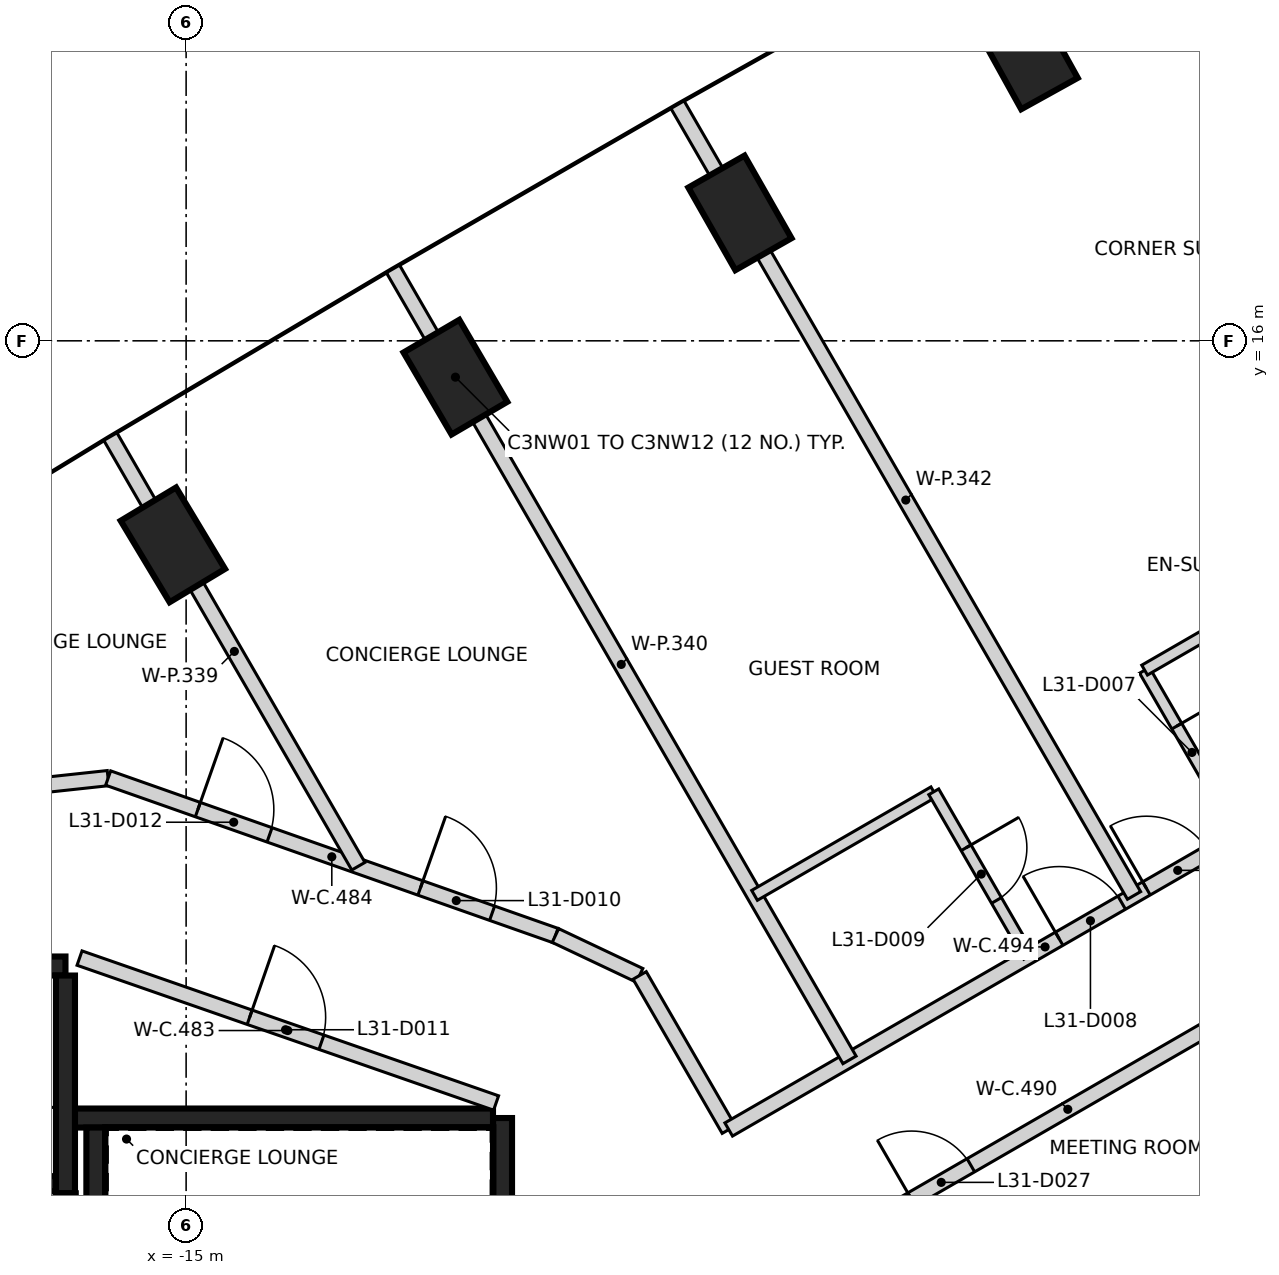
"""IFC4 building model, lengths in metres.
Left out: names, types, materials, properties, quantities, classifications, styles, units other than length and angle.
Written with IfcOpenShell. Run it as: python <this file> out.ifc"""

import sys

from ifc_helpers import new_model, si_unit, direction, frame, frame_2d, origin, origin_2d, place, context, subcontext, project, spatial, rectangle, extrude, element, fill, save


model = new_model("IFC4")
c1 = context("Model", 3, precision=1e-05, world=origin(), true_north=direction((0.0, 1.0)))
c2 = subcontext(c1, "Body", "Model", "MODEL_VIEW")
j1 = project(units=[si_unit("LENGTHUNIT", "METRE"), si_unit("PLANEANGLEUNIT", "RADIAN")], contexts=[c1])
p1 = place(None, origin())
s1 = spatial("IfcSite", under=j1, at=p1, CompositionType="ELEMENT")
p2 = place(p1, origin())
s2 = spatial("IfcBuilding", under=s1, at=p2, CompositionType="ELEMENT")
p3 = place(p2, frame((0.0, 0.0, 128.8)))
s3 = spatial("IfcBuildingStorey", under=s2, at=p3, CompositionType="ELEMENT", Elevation=128.8)
for number, where, z_axis, x_axis in (
    (1, (-3.945, 19.8, -0.4), (0.0, 0.0, 1.0), (-0.485, 0.875, 0.0)),
    (2, (-7.714, 17.683, -0.4), (0.0, 0.0, 1.0), (-0.495, 0.869, 0.0)),
    (3, (-11.457, 15.522, -0.4), (0.0, 0.0, 1.0), (-0.505, 0.863, 0.0)),
    (4, (-15.175, 13.316, -0.4), (0.0, 0.0, 1.0), (-0.515, 0.857, 0.0)),
):
    element("IfcColumn", number, at=place(p3, frame(where, z_axis=z_axis, x_axis=x_axis)), inside=s3, PredefinedType="COLUMN", context=c2, shape_type="SweptSolid", body=[
        extrude(rectangle(XDim=1.25, YDim=0.85, at=origin_2d()), origin(), (0.0, 0.0, 1.0), 3.6),
    ])
p4 = place(p3, frame((-10.837, 5.775, 0.0), z_axis=(0.0, 0.0, 1.0), x_axis=(0.0, -1.0, 0.0)))
e5 = element("IfcWall", 5, at=p4, inside=s3, PredefinedType="SHEAR", context=c2, shape_type="SweptSolid", body=[
    extrude(rectangle(XDim=11.55, YDim=0.25, at=frame_2d((5.775, 0.0))), origin(), (0.0, 0.0, 1.0), 3.2),
])
p5 = place(p4, frame((10.025, 0.0, 0.0)))
e6 = element("IfcOpeningElement", 6, at=p5, cuts=e5, PredefinedType="OPENING", context=c2, shape_type="SweptSolid", body=[
    extrude(rectangle(XDim=1.2, YDim=2.1, at=frame_2d((0.6, 1.05))), frame((0.0, 0.135, 0.0), z_axis=(0.0, -1.0, 0.0), x_axis=(1.0, 0.0, 0.0)), (0.0, 0.0, 1.0), 0.27),
])
p6 = place(p4, frame((8.725, 0.0, 0.0)))
e7 = element("IfcOpeningElement", 7, at=p6, cuts=e5, PredefinedType="OPENING", context=c2, shape_type="SweptSolid", body=[
    extrude(rectangle(XDim=1.2, YDim=2.1, at=frame_2d((0.6, 1.05))), frame((0.0, 0.135, 0.0), z_axis=(0.0, -1.0, 0.0), x_axis=(1.0, 0.0, 0.0)), (0.0, 0.0, 1.0), 0.27),
])
p7 = place(p3, frame((-16.472, 5.775, 0.0), z_axis=(0.0, 0.0, 1.0), x_axis=(1.0, 0.0, 0.0)))
e8 = element("IfcWall", 8, at=p7, inside=s3, PredefinedType="SHEAR", context=c2, shape_type="SweptSolid", body=[
    extrude(rectangle(XDim=5.51, YDim=0.25, at=frame_2d((2.755, 0.0))), origin(), (0.0, 0.0, 1.0), 3.2),
])
p8 = place(p3, frame((-19.637, 7.775, 0.0), z_axis=(0.0, 0.0, 1.0), x_axis=(1.0, 0.0, 0.0)))
e9 = element("IfcWall", 9, at=p8, inside=s3, PredefinedType="SHEAR", context=c2, shape_type="SweptSolid", body=[
    extrude(rectangle(XDim=3.05, YDim=0.25, at=frame_2d((1.525, 0.0))), origin(), (0.0, 0.0, 1.0), 3.2),
])
p9 = place(p3, frame((-16.587, 7.65, 0.0), z_axis=(0.0, 0.0, 1.0), x_axis=(0.0, -1.0, 0.0)))
e10 = element("IfcWall", 10, at=p9, inside=s3, PredefinedType="SHEAR", context=c2, shape_type="SweptSolid", body=[
    extrude(rectangle(XDim=2.865, YDim=0.25, at=frame_2d((1.432, 0.0))), origin(), (0.0, 0.0, 1.0), 3.2),
])
p10 = place(p3, frame((-16.187, 3.2, 0.0), z_axis=(0.0, 0.0, 1.0), x_axis=(0.0, 1.0, 0.0)))
e11 = element("IfcWall", 11, at=p10, inside=s3, PredefinedType="SHEAR", context=c2, shape_type="SweptSolid", body=[
    extrude(rectangle(XDim=2.449, YDim=0.25, at=frame_2d((1.225, 0.0))), origin(), (0.0, 0.0, 1.0), 3.2),
])
p11 = place(p3, frame((-16.577, 4.785, 0.0), z_axis=(0.0, 0.0, 1.0), x_axis=(0.0, -1.0, 0.0)))
e12 = element("IfcWall", 12, at=p11, inside=s3, PredefinedType="SHEAR", context=c2, shape_type="SweptSolid", body=[
    extrude(rectangle(XDim=0.344, YDim=0.25, at=frame_2d((0.172, 0.0))), origin(), (0.0, 0.0, 1.0), 3.2),
])
p12 = place(p3, frame((-19.511, 4.91, 0.0), z_axis=(0.0, 0.0, 1.0), x_axis=(1.0, 0.0, 0.0)))
e13 = element("IfcWall", 13, at=p12, inside=s3, PredefinedType="SHEAR", context=c2, shape_type="SweptSolid", body=[
    extrude(rectangle(XDim=2.798, YDim=0.2, at=frame_2d((1.399, 0.0))), origin(), (0.0, 0.0, 1.0), 3.2),
])
p13 = place(p12, frame((0.949, 0.0, 0.0)))
e14 = element("IfcOpeningElement", 14, at=p13, cuts=e13, PredefinedType="OPENING", context=c2, shape_type="SweptSolid", body=[
    extrude(rectangle(XDim=0.9, YDim=2.1, at=frame_2d((0.45, 1.05))), frame((0.0, 0.11, 0.0), z_axis=(0.0, -1.0, 0.0), x_axis=(1.0, 0.0, 0.0)), (0.0, 0.0, 1.0), 0.22),
])
p14 = place(p3, frame((-18.865, 9.941, 0.0), z_axis=(0.0, 0.0, 1.0), x_axis=(0.99423123086, 0.107257911519, 0.0)))
e15 = element("IfcWall", 15, at=p14, inside=s3, PredefinedType="PARTITIONING", context=c2, shape_type="SweptSolid", body=[
    extrude(rectangle(XDim=2.854, YDim=0.2, at=frame_2d((1.427, 0.0))), origin(), (0.0, 0.0, 1.0), 3.2),
])
p15 = place(p3, frame((-16.402, 7.879, 0.0), z_axis=(0.0, 0.0, 1.0), x_axis=(0.944492255471, -0.328533680702, 0.0)))
e16 = element("IfcWall", 16, at=p15, inside=s3, PredefinedType="PARTITIONING", context=c2, shape_type="SweptSolid", body=[
    extrude(rectangle(XDim=5.802, YDim=0.2, at=frame_2d((2.901, 0.0))), origin(), (0.0, 0.0, 1.0), 3.2),
])
p16 = place(p15, frame((2.37, 0.0, 0.0)))
e17 = element("IfcOpeningElement", 17, at=p16, cuts=e16, PredefinedType="OPENING", context=c2, shape_type="SweptSolid", body=[
    extrude(rectangle(XDim=1.0, YDim=2.1, at=frame_2d((0.5, 1.05))), frame((0.0, 0.11, 0.0), z_axis=(0.0, -1.0, 0.0), x_axis=(1.0, 0.0, 0.0)), (0.0, 0.0, 1.0), 0.22),
])
p17 = place(p3, frame((-16.026, 10.248, 0.0), z_axis=(0.0, 0.0, 1.0), x_axis=(0.943234993827, -0.332126100179, 0.0)))
e18 = element("IfcWall", 18, at=p17, inside=s3, PredefinedType="PARTITIONING", context=c2, shape_type="SweptSolid", body=[
    extrude(rectangle(XDim=6.239, YDim=0.2, at=frame_2d((3.119, 0.0))), origin(), (0.0, 0.0, 1.0), 3.2),
])
p18 = place(p17, frame((4.355, 0.0, 0.0)))
e19 = element("IfcOpeningElement", 19, at=p18, cuts=e18, PredefinedType="OPENING", context=c2, shape_type="SweptSolid", body=[
    extrude(rectangle(XDim=1.0, YDim=2.1, at=frame_2d((0.5, 1.05))), frame((0.0, 0.11, 0.0), z_axis=(0.0, -1.0, 0.0), x_axis=(1.0, 0.0, 0.0)), (0.0, 0.0, 1.0), 0.22),
])
p19 = place(p17, frame((1.251, 0.0, 0.0)))
e20 = element("IfcOpeningElement", 20, at=p19, cuts=e18, PredefinedType="OPENING", context=c2, shape_type="SweptSolid", body=[
    extrude(rectangle(XDim=1.0, YDim=2.1, at=frame_2d((0.5, 1.05))), frame((0.0, 0.11, 0.0), z_axis=(0.0, -1.0, 0.0), x_axis=(1.0, 0.0, 0.0)), (0.0, 0.0, 1.0), 0.22),
])
p20 = place(p3, frame((-10.141, 8.176, 0.0), z_axis=(0.0, 0.0, 1.0), x_axis=(0.903904169039, -0.427735026849, 0.0)))
e21 = element("IfcWall", 21, at=p20, inside=s3, PredefinedType="PARTITIONING", context=c2, shape_type="SweptSolid", body=[
    extrude(rectangle(XDim=1.225, YDim=0.2, at=frame_2d((0.612, 0.0))), origin(), (0.0, 0.0, 1.0), 3.2),
])
p21 = place(p3, frame((-9.033, 7.651, 0.0), z_axis=(0.0, 0.0, 1.0), x_axis=(0.500354010599, -0.865820919173, 0.0)))
e22 = element("IfcWall", 22, at=p21, inside=s3, PredefinedType="PARTITIONING", context=c2, shape_type="SweptSolid", body=[
    extrude(rectangle(XDim=2.342, YDim=0.2, at=frame_2d((1.171, 0.0))), origin(), (0.0, 0.0, 1.0), 3.2),
])
p22 = place(p3, frame((-8.613, 2.881, 0.0), z_axis=(0.0, 0.0, 1.0), x_axis=(0.866103179807, 0.499865263774, 0.0)))
e23 = element("IfcWall", 23, at=p22, inside=s3, PredefinedType="PARTITIONING", context=c2, shape_type="SweptSolid", body=[
    extrude(rectangle(XDim=12.036, YDim=0.2, at=frame_2d((6.018, 0.0))), origin(), (0.0, 0.0, 1.0), 3.2),
])
p23 = place(p22, frame((9.652, 0.0, 0.0)))
e24 = element("IfcOpeningElement", 24, at=p23, cuts=e23, PredefinedType="OPENING", context=c2, shape_type="SweptSolid", body=[
    extrude(rectangle(XDim=0.9, YDim=2.1, at=frame_2d((0.45, 1.05))), frame((0.0, 0.11, 0.0), z_axis=(0.0, -1.0, 0.0), x_axis=(1.0, 0.0, 0.0)), (0.0, 0.0, 1.0), 0.22),
])
p24 = place(p22, frame((3.646, 0.0, 0.0)))
e25 = element("IfcOpeningElement", 25, at=p24, cuts=e23, PredefinedType="OPENING", context=c2, shape_type="SweptSolid", body=[
    extrude(rectangle(XDim=0.9, YDim=2.1, at=frame_2d((0.45, 1.05))), frame((0.0, 0.11, 0.0), z_axis=(0.0, -1.0, 0.0), x_axis=(1.0, 0.0, 0.0)), (0.0, 0.0, 1.0), 0.22),
])
p25 = place(p3, frame((-7.862, 5.624, 0.0), z_axis=(0.0, 0.0, 1.0), x_axis=(0.866109024618, 0.499855136491, 0.0)))
e26 = element("IfcWall", 26, at=p25, inside=s3, PredefinedType="PARTITIONING", context=c2, shape_type="SweptSolid", body=[
    extrude(rectangle(XDim=9.61, YDim=0.2, at=frame_2d((4.805, 0.0))), origin(), (0.0, 0.0, 1.0), 3.2),
])
p26 = place(p25, frame((6.345, 0.0, 0.0)))
e27 = element("IfcOpeningElement", 27, at=p26, cuts=e26, PredefinedType="OPENING", context=c2, shape_type="SweptSolid", body=[
    extrude(rectangle(XDim=0.95, YDim=2.1, at=frame_2d((0.475, 1.05))), frame((0.0, 0.11, 0.0), z_axis=(0.0, -1.0, 0.0), x_axis=(1.0, 0.0, 0.0)), (0.0, 0.0, 1.0), 0.22),
])
p27 = place(p25, frame((5.02, 0.0, 0.0)))
e28 = element("IfcOpeningElement", 28, at=p27, cuts=e26, PredefinedType="OPENING", context=c2, shape_type="SweptSolid", body=[
    extrude(rectangle(XDim=0.95, YDim=2.1, at=frame_2d((0.475, 1.05))), frame((0.0, 0.11, 0.0), z_axis=(0.0, -1.0, 0.0), x_axis=(1.0, 0.0, 0.0)), (0.0, 0.0, 1.0), 0.22),
])
p28 = place(p3, frame((-15.996, 14.74, 0.0), z_axis=(0.0, 0.0, 1.0), x_axis=(0.499925398456, -0.866068470722, 0.0)))
e29 = element("IfcWall", 29, at=p28, inside=s3, PredefinedType="PARTITIONING", context=c2, shape_type="SweptSolid", body=[
    extrude(rectangle(XDim=6.526, YDim=0.2, at=frame_2d((3.263, 0.0))), origin(), (0.0, 0.0, 1.0), 3.2),
])
p29 = place(p3, frame((-12.279, 16.946, 0.0), z_axis=(0.0, 0.0, 1.0), x_axis=(0.499902454835, -0.866081714187, 0.0)))
e30 = element("IfcWall", 30, at=p29, inside=s3, PredefinedType="PARTITIONING", context=c2, shape_type="SweptSolid", body=[
    extrude(rectangle(XDim=12.015, YDim=0.2, at=frame_2d((6.008, 0.0))), origin(), (0.0, 0.0, 1.0), 3.2),
])
p30 = place(p3, frame((-8.535, 19.107, 0.0), z_axis=(0.0, 0.0, 1.0), x_axis=(0.499972843048, -0.86604108229, 0.0)))
e31 = element("IfcWall", 31, at=p30, inside=s3, PredefinedType="PARTITIONING", context=c2, shape_type="SweptSolid", body=[
    extrude(rectangle(XDim=12.013, YDim=0.2, at=frame_2d((6.007, 0.0))), origin(), (0.0, 0.0, 1.0), 3.2),
])
p31 = place(p3, frame((-8.0, 0.924, 0.0), z_axis=(0.0, 0.0, 1.0), x_axis=(0.86604129137, 0.499972480886, 0.0)))
e32 = element("IfcWall", 32, at=p31, inside=s3, PredefinedType="PARTITIONING", context=c2, shape_type="SweptSolid", body=[
    extrude(rectangle(XDim=12.932, YDim=0.2, at=frame_2d((6.466, 0.0))), origin(), (0.0, 0.0, 1.0), 2.3),
])
p32 = place(p3, frame((-7.522, 8.704, 0.0), z_axis=(0.0, 0.0, 1.0), x_axis=(0.865972067821, 0.500092369221, 0.0)))
e33 = element("IfcWall", 33, at=p32, inside=s3, PredefinedType="PARTITIONING", context=c2, shape_type="SweptSolid", body=[
    extrude(rectangle(XDim=2.723, YDim=0.15, at=frame_2d((1.362, 0.0))), origin(), (0.0, 0.0, 1.0), 3.2),
])
p33 = place(p3, frame((-5.164, 10.067, 0.0), z_axis=(0.0, 0.0, 1.0), x_axis=(0.500046524342, -0.865998541277, 0.0)))
e34 = element("IfcWall", 34, at=p33, inside=s3, PredefinedType="PARTITIONING", context=c2, shape_type="SweptSolid", body=[
    extrude(rectangle(XDim=2.5, YDim=0.15, at=frame_2d((1.25, 0.0))), origin(), (0.0, 0.0, 1.0), 3.2),
])
p34 = place(p33, frame((0.85, 0.0, 0.0)))
e35 = element("IfcOpeningElement", 35, at=p34, cuts=e34, PredefinedType="OPENING", context=c2, shape_type="SweptSolid", body=[
    extrude(rectangle(XDim=0.8, YDim=2.1, at=frame_2d((0.4, 1.05))), frame((0.0, 0.085, 0.0), z_axis=(0.0, -1.0, 0.0), x_axis=(1.0, 0.0, 0.0)), (0.0, 0.0, 1.0), 0.17),
])
p35 = place(p3, frame((-2.391, 11.665, 0.0), z_axis=(0.0, 0.0, 1.0), x_axis=(0.500049599607, -0.865996765544, 0.0)))
e36 = element("IfcWall", 36, at=p35, inside=s3, PredefinedType="PARTITIONING", context=c2, shape_type="SweptSolid", body=[
    extrude(rectangle(XDim=2.498, YDim=0.15, at=frame_2d((1.249, 0.0))), origin(), (0.0, 0.0, 1.0), 3.2),
])
p36 = place(p35, frame((0.848, 0.0, 0.0)))
e37 = element("IfcOpeningElement", 37, at=p36, cuts=e36, PredefinedType="OPENING", context=c2, shape_type="SweptSolid", body=[
    extrude(rectangle(XDim=0.8, YDim=2.1, at=frame_2d((0.4, 1.05))), frame((0.0, 0.085, 0.0), z_axis=(0.0, -1.0, 0.0), x_axis=(1.0, 0.0, 0.0)), (0.0, 0.0, 1.0), 0.17),
])
p37 = place(p3, frame((-2.39, 11.668, 0.0), z_axis=(0.0, 0.0, 1.0), x_axis=(0.865932482239, 0.500160910312, 0.0)))
e38 = element("IfcWall", 38, at=p37, inside=s3, PredefinedType="PARTITIONING", context=c2, shape_type="SweptSolid", body=[
    extrude(rectangle(XDim=1.848, YDim=0.15, at=frame_2d((0.924, 0.0))), origin(), (0.0, 0.0, 1.0), 3.2),
])
p38 = place(p26, origin())
e39 = element("IfcDoor", 39, at=p38, inside=s3, OperationType="SINGLE_SWING_LEFT", PredefinedType="DOOR", context=c2, shape_type="SweptSolid", body=[
    extrude(rectangle(XDim=0.95, YDim=2.1, at=frame_2d((0.475, 1.05))), frame((0.0, 0.025, 0.0), z_axis=(0.0, -1.0, 0.0), x_axis=(1.0, 0.0, 0.0)), (0.0, 0.0, 1.0), 0.05),
])
fill(e27, e39)
p39 = place(p36, origin())
e40 = element("IfcDoor", 40, at=p39, inside=s3, OperationType="SINGLE_SWING_LEFT", PredefinedType="DOOR", context=c2, shape_type="SweptSolid", body=[
    extrude(rectangle(XDim=0.8, YDim=2.1, at=frame_2d((0.4, 1.05))), frame((0.0, 0.025, 0.0), z_axis=(0.0, -1.0, 0.0), x_axis=(1.0, 0.0, 0.0)), (0.0, 0.0, 1.0), 0.05),
])
fill(e37, e40)
p40 = place(p27, origin())
e41 = element("IfcDoor", 41, at=p40, inside=s3, OperationType="SINGLE_SWING_LEFT", PredefinedType="DOOR", context=c2, shape_type="SweptSolid", body=[
    extrude(rectangle(XDim=0.95, YDim=2.1, at=frame_2d((0.475, 1.05))), frame((0.0, 0.025, 0.0), z_axis=(0.0, -1.0, 0.0), x_axis=(1.0, 0.0, 0.0)), (0.0, 0.0, 1.0), 0.05),
])
fill(e28, e41)
p41 = place(p34, frame((0.8, 0.0, 0.0), z_axis=(0.0, 0.0, 1.0), x_axis=(-1.0, 0.0, 0.0)))
e42 = element("IfcDoor", 42, at=p41, inside=s3, OperationType="SINGLE_SWING_LEFT", PredefinedType="DOOR", context=c2, shape_type="SweptSolid", body=[
    extrude(rectangle(XDim=0.8, YDim=2.1, at=frame_2d((0.4, 1.05))), frame((0.0, 0.025, 0.0), z_axis=(0.0, -1.0, 0.0), x_axis=(1.0, 0.0, 0.0)), (0.0, 0.0, 1.0), 0.05),
])
fill(e35, e42)
p42 = place(p18, origin())
e43 = element("IfcDoor", 43, at=p42, inside=s3, OperationType="SINGLE_SWING_LEFT", PredefinedType="DOOR", context=c2, shape_type="SweptSolid", body=[
    extrude(rectangle(XDim=1.0, YDim=2.1, at=frame_2d((0.5, 1.05))), frame((0.0, 0.025, 0.0), z_axis=(0.0, -1.0, 0.0), x_axis=(1.0, 0.0, 0.0)), (0.0, 0.0, 1.0), 0.05),
])
fill(e19, e43)
p43 = place(p16, frame((1.0, 0.0, 0.0), z_axis=(0.0, 0.0, 1.0), x_axis=(-1.0, 0.0, 0.0)))
e44 = element("IfcDoor", 44, at=p43, inside=s3, OperationType="SINGLE_SWING_LEFT", PredefinedType="DOOR", context=c2, shape_type="SweptSolid", body=[
    extrude(rectangle(XDim=1.0, YDim=2.1, at=frame_2d((0.5, 1.05))), frame((0.0, 0.025, 0.0), z_axis=(0.0, -1.0, 0.0), x_axis=(1.0, 0.0, 0.0)), (0.0, 0.0, 1.0), 0.05),
])
fill(e17, e44)
p44 = place(p19, origin())
e45 = element("IfcDoor", 45, at=p44, inside=s3, OperationType="SINGLE_SWING_LEFT", PredefinedType="DOOR", context=c2, shape_type="SweptSolid", body=[
    extrude(rectangle(XDim=1.0, YDim=2.1, at=frame_2d((0.5, 1.05))), frame((0.0, 0.025, 0.0), z_axis=(0.0, -1.0, 0.0), x_axis=(1.0, 0.0, 0.0)), (0.0, 0.0, 1.0), 0.05),
])
fill(e20, e45)
p45 = place(p24, frame((0.9, 0.0, 0.0), z_axis=(0.0, 0.0, 1.0), x_axis=(-1.0, 0.0, 0.0)))
e46 = element("IfcDoor", 46, at=p45, inside=s3, OperationType="SINGLE_SWING_LEFT", PredefinedType="DOOR", context=c2, shape_type="SweptSolid", body=[
    extrude(rectangle(XDim=0.9, YDim=2.1, at=frame_2d((0.45, 1.05))), frame((0.0, 0.025, 0.0), z_axis=(0.0, -1.0, 0.0), x_axis=(1.0, 0.0, 0.0)), (0.0, 0.0, 1.0), 0.05),
])
fill(e25, e46)
save(model, sys.argv[1])
